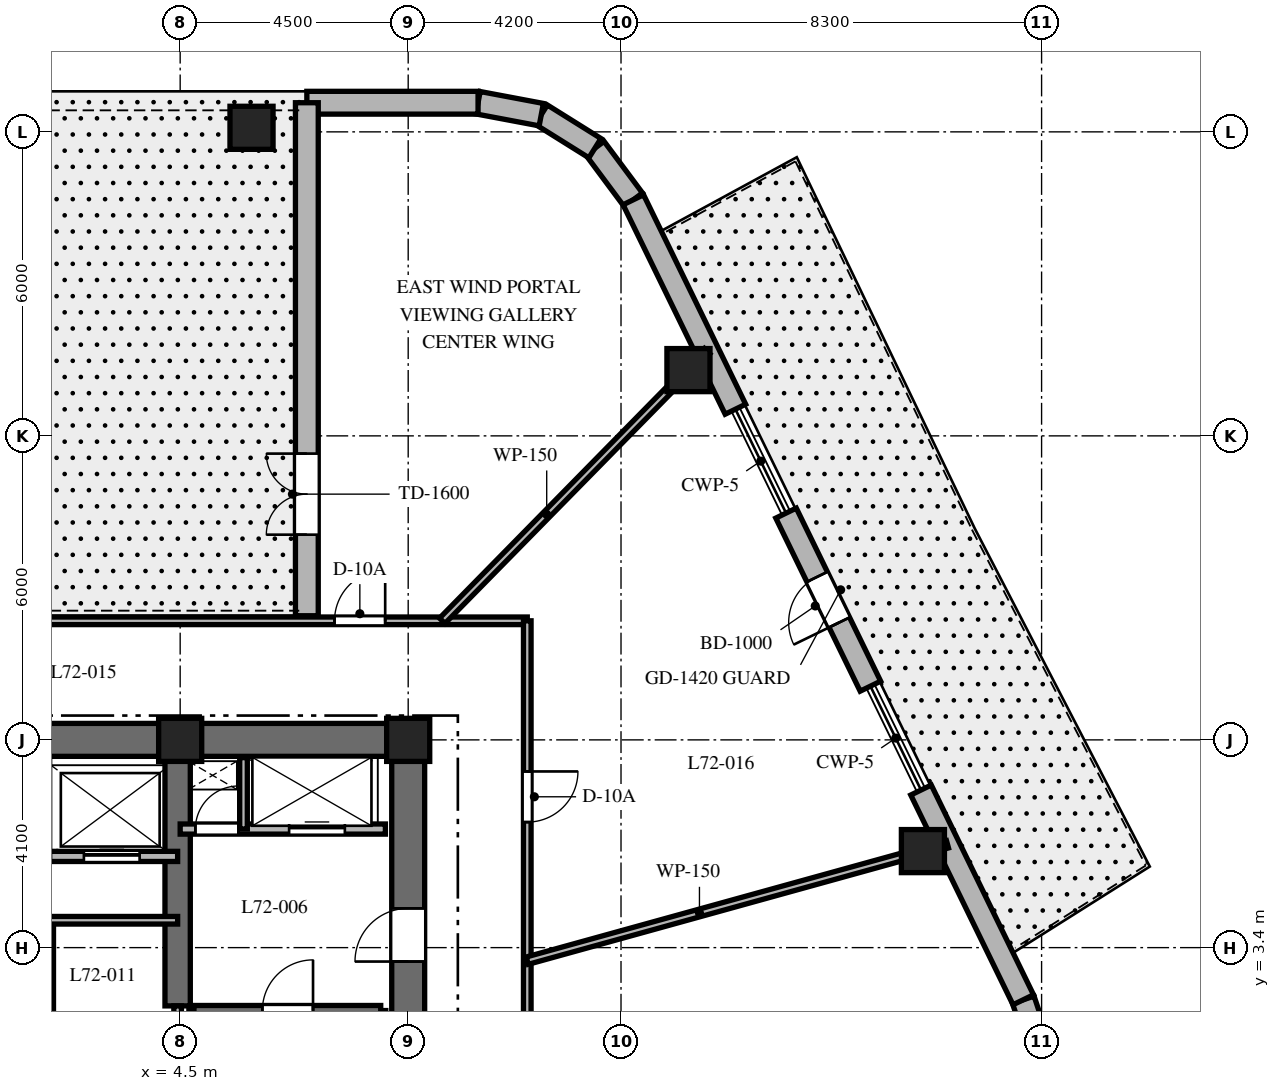
"""IFC4 building model, lengths in metres.
Left out: names, types, materials, properties, quantities, classifications, styles, units other than length and angle.
Written with IfcOpenShell. Run it as: python <this file> out.ifc"""

import sys

from ifc_helpers import new_model, si_unit, direction, frame, frame_2d, origin, origin_2d, place, context, subcontext, project, spatial, rectangle, extrude, element, fill, save


model = new_model("IFC4")
c1 = context("Model", 3, precision=1e-05, world=origin(), true_north=direction((0.0, 1.0)))
c2 = subcontext(c1, "Body", "Model", "MODEL_VIEW")
j1 = project(units=[si_unit("LENGTHUNIT", "METRE"), si_unit("PLANEANGLEUNIT", "RADIAN")], contexts=[c1])
p1 = place(None, origin())
s1 = spatial("IfcSite", under=j1, at=p1, CompositionType="ELEMENT")
p2 = place(p1, origin())
s2 = spatial("IfcBuilding", under=s1, at=p2, CompositionType="ELEMENT")
p3 = place(p2, frame((0.0, 0.0, 288.6)))
s3 = spatial("IfcBuildingStorey", under=s2, at=p3, CompositionType="ELEMENT", Elevation=288.6)
p4 = place(p3, frame((1.85, 7.5, 0.0), z_axis=(0.0, 0.0, 1.0), x_axis=(1.0, 0.0, 0.0)))
e1 = element("IfcWall", 1, at=p4, inside=s3, PredefinedType="SHEAR", context=c2, shape_type="SweptSolid", body=[
    extrude(rectangle(XDim=7.475, YDim=0.65, at=frame_2d((3.737, 0.0))), origin(), (0.0, 0.0, 1.0), 4.5),
])
p5 = place(p3, frame((9.0, -7.175, 0.0), z_axis=(0.0, 0.0, 1.0), x_axis=(0.0, 1.0, 0.0)))
e2 = element("IfcWall", 2, at=p5, inside=s3, PredefinedType="SHEAR", context=c2, shape_type="SweptSolid", body=[
    extrude(rectangle(XDim=14.35, YDim=0.65, at=frame_2d((7.175, 0.0))), origin(), (0.0, 0.0, 1.0), 4.5),
])
p6 = place(p5, frame((10.3, 0.0, 0.0)))
e3 = element("IfcOpeningElement", 3, at=p6, cuts=e2, PredefinedType="OPENING", context=c2, shape_type="SweptSolid", body=[
    extrude(rectangle(XDim=1.05, YDim=2.15, at=frame_2d((0.525, 1.075))), frame((0.0, 0.335, 0.0), z_axis=(0.0, -1.0, 0.0), x_axis=(1.0, 0.0, 0.0)), (0.0, 0.0, 1.0), 0.67),
])
p7 = place(p3, frame((4.45, 2.25, 0.0), z_axis=(0.0, 0.0, 1.0), x_axis=(0.0, 1.0, 0.0)))
e4 = element("IfcWall", 4, at=p7, inside=s3, PredefinedType="SHEAR", context=c2, shape_type="SweptSolid", body=[
    extrude(rectangle(XDim=4.925, YDim=0.5, at=frame_2d((2.462, 0.0))), origin(), (0.0, 0.0, 1.0), 4.5),
])
for number, where, z_axis, x_axis in (
    (5, (4.772, -6.985, 0.0), (0.0, 0.0, 1.0), (0.0, 1.0, 0.0)),
    (6, (8.458, -6.985, 0.0), (0.0, 0.0, 1.0), (0.0, 1.0, 0.0)),
):
    element("IfcWall", number, at=place(p3, frame(where, z_axis=z_axis, x_axis=x_axis)), inside=s3, PredefinedType="SHEAR", context=c2, shape_type="SweptSolid", body=[
        extrude(rectangle(XDim=9.143, YDim=0.2, at=frame_2d((4.572, 0.0))), origin(), (0.0, 0.0, 1.0), 4.5),
    ])
p8 = place(p3, frame((4.772, 2.158, 0.0), z_axis=(0.0, 0.0, 1.0), x_axis=(1.0, 0.0, 0.0)))
e7 = element("IfcWall", 7, at=p8, inside=s3, PredefinedType="SHEAR", context=c2, shape_type="SweptSolid", body=[
    extrude(rectangle(XDim=3.686, YDim=0.2, at=frame_2d((1.843, 0.0))), origin(), (0.0, 0.0, 1.0), 4.5),
])
p9 = place(p8, frame((1.35, 0.0, 0.0)))
e8 = element("IfcOpeningElement", 8, at=p9, cuts=e7, PredefinedType="OPENING", context=c2, shape_type="SweptSolid", body=[
    extrude(rectangle(XDim=1.0, YDim=2.15, at=frame_2d((0.5, 1.075))), frame((0.0, 0.11, 0.0), z_axis=(0.0, -1.0, 0.0), x_axis=(1.0, 0.0, 0.0)), (0.0, 0.0, 1.0), 0.22),
])
for number, where, z_axis, x_axis in (
    (9, (9.0, 7.5, 0.0), (0.0, 0.0, 1.0), (1.0, 0.0, 0.0)),
    (10, (4.5, 7.5, 0.0), (0.0, 0.0, 1.0), (1.0, 0.0, 0.0)),
    (11, (19.158, 5.305, 0.0), (0.0, 0.0, 1.0), (1.0, 0.0, 0.0)),
    (12, (14.531, 14.798, 0.0), (0.0, 0.0, 1.0), (1.0, 0.0, 0.0)),
    (13, (5.908, 19.58, 0.0), (0.0, 0.0, 1.0), (1.0, 0.0, 0.0)),
):
    element("IfcColumn", number, at=place(p3, frame(where, z_axis=z_axis, x_axis=x_axis)), inside=s3, PredefinedType="COLUMN", context=c2, shape_type="SweptSolid", body=[
        extrude(rectangle(XDim=0.85, YDim=0.85, at=origin_2d()), origin(), (0.0, 0.0, 1.0), 4.5),
    ])
p10 = place(p3, frame((21.422, 1.522, 0.0), z_axis=(0.0, 0.0, 1.0), x_axis=(-0.316964162323, 0.94843751497, 0.0)))
e14 = element("IfcWall", 14, at=p10, inside=s3, PredefinedType="SOLIDWALL", context=c2, shape_type="SweptSolid", body=[
    extrude(rectangle(XDim=0.895, YDim=0.45, at=frame_2d((0.448, 0.0))), origin(), (0.0, 0.0, 1.0), 4.18),
])
p11 = place(p3, frame((13.443, 18.16, 0.0), z_axis=(0.0, 0.0, 1.0), x_axis=(-0.597042425808, 0.802209661987, 0.0)))
e15 = element("IfcWall", 15, at=p11, inside=s3, PredefinedType="SOLIDWALL", context=c2, shape_type="SweptSolid", body=[
    extrude(rectangle(XDim=1.27, YDim=0.45, at=frame_2d((0.635, 0.0))), origin(), (0.0, 0.0, 1.0), 4.18),
])
p12 = place(p3, frame((12.685, 19.178, 0.0), z_axis=(0.0, 0.0, 1.0), x_axis=(-0.848031272749, 0.529946186362, 0.0)))
e16 = element("IfcWall", 16, at=p12, inside=s3, PredefinedType="SOLIDWALL", context=c2, shape_type="SweptSolid", body=[
    extrude(rectangle(XDim=1.248, YDim=0.45, at=frame_2d((0.624, 0.0))), origin(), (0.0, 0.0, 1.0), 4.18),
])
p13 = place(p3, frame((11.626, 19.84, 0.0), z_axis=(0.0, 0.0, 1.0), x_axis=(-0.982701956681, 0.185194126083, 0.0)))
e17 = element("IfcWall", 17, at=p13, inside=s3, PredefinedType="SOLIDWALL", context=c2, shape_type="SweptSolid", body=[
    extrude(rectangle(XDim=1.27, YDim=0.45, at=frame_2d((0.635, 0.0))), origin(), (0.0, 0.0, 1.0), 4.18),
])
p14 = place(p3, frame((21.138, 2.371, 0.0), z_axis=(0.0, 0.0, 1.0), x_axis=(-0.438135313339, 0.898909031663, 0.0)))
e18 = element("IfcWall", 18, at=p14, inside=s3, PredefinedType="SOLIDWALL", context=c2, shape_type="SweptSolid", body=[
    extrude(rectangle(XDim=4.605, YDim=0.45, at=frame_2d((2.302, 0.0))), origin(), (0.0, 0.0, 1.0), 4.18),
])
p15 = place(p3, frame((18.122, 8.56, 0.0), z_axis=(0.0, 0.0, 1.0), x_axis=(-0.438118536586, 0.89891720859, 0.0)))
e19 = element("IfcWall", 19, at=p15, inside=s3, PredefinedType="SOLIDWALL", context=c2, shape_type="SweptSolid", body=[
    extrude(rectangle(XDim=3.8, YDim=0.45, at=frame_2d((1.9, 0.0))), origin(), (0.0, 0.0, 1.0), 4.18),
])
p16 = place(p15, frame((1.4, 0.0, 0.0)))
e20 = element("IfcOpeningElement", 20, at=p16, cuts=e19, PredefinedType="OPENING", context=c2, shape_type="SweptSolid", body=[
    extrude(rectangle(XDim=1.0, YDim=2.15, at=frame_2d((0.5, 1.075))), frame((0.0, 0.235, 0.0), z_axis=(0.0, -1.0, 0.0), x_axis=(1.0, 0.0, 0.0)), (0.0, 0.0, 1.0), 0.47),
])
p17 = place(p3, frame((15.458, 14.026, 0.0), z_axis=(0.0, 0.0, 1.0), x_axis=(-0.438101439155, 0.898925541416, 0.0)))
e21 = element("IfcWall", 21, at=p17, inside=s3, PredefinedType="SOLIDWALL", context=c2, shape_type="SweptSolid", body=[
    extrude(rectangle(XDim=4.599, YDim=0.45, at=frame_2d((2.299, 0.0))), origin(), (0.0, 0.0, 1.0), 4.18),
])
p18 = place(p3, frame((10.379, 20.075, 0.0), z_axis=(0.0, 0.0, 1.0), x_axis=(-1.0, 0.0, 0.0)))
e22 = element("IfcWall", 22, at=p18, inside=s3, PredefinedType="SOLIDWALL", context=c2, shape_type="SweptSolid", body=[
    extrude(rectangle(XDim=3.379, YDim=0.45, at=frame_2d((1.689, 0.0))), origin(), (0.0, 0.0, 1.0), 4.18),
])
p19 = place(p3, frame((7.0, 9.95, 0.0), z_axis=(0.0, 0.0, 1.0), x_axis=(0.0, 1.0, 0.0)))
e23 = element("IfcWall", 23, at=p19, inside=s3, PredefinedType="SOLIDWALL", context=c2, shape_type="SweptSolid", body=[
    extrude(rectangle(XDim=10.125, YDim=0.45, at=frame_2d((5.062, 0.0))), origin(), (0.0, 0.0, 1.0), 4.18),
])
p20 = place(p19, frame((1.6, 0.0, 0.0)))
e24 = element("IfcOpeningElement", 24, at=p20, cuts=e23, PredefinedType="OPENING", context=c2, shape_type="SweptSolid", body=[
    extrude(rectangle(XDim=1.6, YDim=2.25, at=frame_2d((0.8, 1.125))), frame((0.0, 0.235, 0.0), z_axis=(0.0, -1.0, 0.0), x_axis=(1.0, 0.0, 0.0)), (0.0, 0.0, 1.0), 0.47),
])
p21 = place(p3, frame((4.5, 5.74, 0.0), z_axis=(0.0, 0.0, 1.0), x_axis=(1.0, 0.0, 0.0)))
e25 = element("IfcWall", 25, at=p21, inside=s3, PredefinedType="PARTITIONING", context=c2, shape_type="SweptSolid", body=[
    extrude(rectangle(XDim=4.05, YDim=0.2, at=frame_2d((2.025, 0.0))), origin(), (0.0, 0.0, 1.0), 4.18),
])
p22 = place(p21, frame((0.3, 0.0, 0.0)))
e26 = element("IfcOpeningElement", 26, at=p22, cuts=e25, PredefinedType="OPENING", context=c2, shape_type="SweptSolid", body=[
    extrude(rectangle(XDim=0.85, YDim=2.03, at=frame_2d((0.425, 1.015))), frame((0.0, 0.11, 0.0), z_axis=(0.0, -1.0, 0.0), x_axis=(1.0, 0.0, 0.0)), (0.0, 0.0, 1.0), 0.22),
])
p23 = place(p21, frame((2.15, 0.0, 0.0)))
e27 = element("IfcOpeningElement", 27, at=p23, cuts=e25, PredefinedType="OPENING", context=c2, shape_type="SweptSolid", body=[
    extrude(rectangle(XDim=1.1, YDim=2.2, at=frame_2d((0.55, 1.1))), frame((0.0, 0.11, 0.0), z_axis=(0.0, -1.0, 0.0), x_axis=(1.0, 0.0, 0.0)), (0.0, 0.0, 1.0), 0.22),
])
p24 = place(p3, frame((5.75, 5.74, 0.0), z_axis=(0.0, 0.0, 1.0), x_axis=(0.0, 1.0, 0.0)))
e28 = element("IfcWall", 28, at=p24, inside=s3, PredefinedType="PARTITIONING", context=c2, shape_type="SweptSolid", body=[
    extrude(rectangle(XDim=1.41, YDim=0.15, at=frame_2d((0.705, 0.0))), origin(), (0.0, 0.0, 1.0), 4.18),
])
p25 = place(p3, frame((1.85, 5.2, 0.0), z_axis=(0.0, 0.0, 1.0), x_axis=(1.0, 0.0, 0.0)))
e29 = element("IfcWall", 29, at=p25, inside=s3, PredefinedType="PARTITIONING", context=c2, shape_type="SweptSolid", body=[
    extrude(rectangle(XDim=2.6, YDim=0.2, at=frame_2d((1.3, 0.0))), origin(), (0.0, 0.0, 1.0), 4.18),
])
p26 = place(p25, frame((0.75, 0.0, 0.0)))
e30 = element("IfcOpeningElement", 30, at=p26, cuts=e29, PredefinedType="OPENING", context=c2, shape_type="SweptSolid", body=[
    extrude(rectangle(XDim=1.1, YDim=2.2, at=frame_2d((0.55, 1.1))), frame((0.0, 0.11, 0.0), z_axis=(0.0, -1.0, 0.0), x_axis=(1.0, 0.0, 0.0)), (0.0, 0.0, 1.0), 0.22),
])
p27 = place(p3, frame((4.45, -1.972, 0.0), z_axis=(0.0, 0.0, 1.0), x_axis=(0.0, 1.0, 0.0)))
e31 = element("IfcWall", 31, at=p27, inside=s3, PredefinedType="PARTITIONING", context=c2, shape_type="SweptSolid", body=[
    extrude(rectangle(XDim=4.222, YDim=0.15, at=frame_2d((2.111, 0.0))), origin(), (0.0, 0.0, 1.0), 4.18),
])
p28 = place(p3, frame((1.9, -0.5, 0.0), z_axis=(0.0, 0.0, 1.0), x_axis=(0.0, 1.0, 0.0)))
e32 = element("IfcWall", 32, at=p28, inside=s3, PredefinedType="PARTITIONING", context=c2, shape_type="SweptSolid", body=[
    extrude(rectangle(XDim=4.44, YDim=0.2, at=frame_2d((2.22, 0.0))), origin(), (0.0, 0.0, 1.0), 4.18),
])
p29 = place(p28, frame((1.55, 0.0, 0.0)))
e33 = element("IfcOpeningElement", 33, at=p29, cuts=e32, PredefinedType="OPENING", context=c2, shape_type="SweptSolid", body=[
    extrude(rectangle(XDim=0.85, YDim=2.03, at=frame_2d((0.425, 1.015))), frame((0.0, 0.11, 0.0), z_axis=(0.0, -1.0, 0.0), x_axis=(1.0, 0.0, 0.0)), (0.0, 0.0, 1.0), 0.22),
])
p30 = place(p3, frame((1.9, 3.94, 0.0), z_axis=(0.0, 0.0, 1.0), x_axis=(1.0, 0.0, 0.0)))
e34 = element("IfcWall", 34, at=p30, inside=s3, PredefinedType="PARTITIONING", context=c2, shape_type="SweptSolid", body=[
    extrude(rectangle(XDim=2.55, YDim=0.15, at=frame_2d((1.275, 0.0))), origin(), (0.0, 0.0, 1.0), 4.18),
])
p31 = place(p3, frame((-11.35, 9.85, 0.0), z_axis=(0.0, 0.0, 1.0), x_axis=(1.0, 0.0, 0.0)))
e35 = element("IfcWall", 35, at=p31, inside=s3, PredefinedType="PARTITIONING", context=c2, shape_type="SweptSolid", body=[
    extrude(rectangle(XDim=22.7, YDim=0.15, at=frame_2d((11.35, 0.0))), origin(), (0.0, 0.0, 1.0), 3.67),
])
p32 = place(p31, frame((18.896, 0.0, 0.0)))
e36 = element("IfcOpeningElement", 36, at=p32, cuts=e35, PredefinedType="OPENING", context=c2, shape_type="SweptSolid", body=[
    extrude(rectangle(XDim=1.0, YDim=2.03, at=frame_2d((0.5, 1.015))), frame((0.0, 0.085, 0.0), z_axis=(0.0, -1.0, 0.0), x_axis=(1.0, 0.0, 0.0)), (0.0, 0.0, 1.0), 0.17),
])
p33 = place(p3, frame((11.35, 9.85, 0.0), z_axis=(0.0, 0.0, 1.0), x_axis=(0.0, -1.0, 0.0)))
e37 = element("IfcWall", 37, at=p33, inside=s3, PredefinedType="PARTITIONING", context=c2, shape_type="SweptSolid", body=[
    extrude(rectangle(XDim=19.7, YDim=0.15, at=frame_2d((9.85, 0.0))), origin(), (0.0, 0.0, 1.0), 3.67),
])
p34 = place(p33, frame((2.973, 0.0, 0.0)))
e38 = element("IfcOpeningElement", 38, at=p34, cuts=e37, PredefinedType="OPENING", context=c2, shape_type="SweptSolid", body=[
    extrude(rectangle(XDim=1.0, YDim=2.03, at=frame_2d((0.5, 1.015))), frame((0.0, 0.085, 0.0), z_axis=(0.0, -1.0, 0.0), x_axis=(1.0, 0.0, 0.0)), (0.0, 0.0, 1.0), 0.17),
])
p35 = place(p33, frame((15.189, 0.0, 0.0)))
e39 = element("IfcOpeningElement", 39, at=p35, cuts=e37, PredefinedType="OPENING", context=c2, shape_type="SweptSolid", body=[
    extrude(rectangle(XDim=1.0, YDim=2.03, at=frame_2d((0.5, 1.015))), frame((0.0, 0.085, 0.0), z_axis=(0.0, -1.0, 0.0), x_axis=(1.0, 0.0, 0.0)), (0.0, 0.0, 1.0), 0.17),
])
p36 = place(p33, frame((8.81, 0.0, 0.0)))
e40 = element("IfcOpeningElement", 40, at=p36, cuts=e37, PredefinedType="OPENING", context=c2, shape_type="SweptSolid", body=[
    extrude(rectangle(XDim=1.0, YDim=2.03, at=frame_2d((0.5, 1.015))), frame((0.0, 0.085, 0.0), z_axis=(0.0, -1.0, 0.0), x_axis=(1.0, 0.0, 0.0)), (0.0, 0.0, 1.0), 0.17),
])
p37 = place(p3, frame((11.35, 3.143, 0.0), z_axis=(0.0, 0.0, 1.0), x_axis=(0.963731818141, 0.266872596386, 0.0)))
e41 = element("IfcWall", 41, at=p37, inside=s3, PredefinedType="PARTITIONING", context=c2, shape_type="SweptSolid", body=[
    extrude(rectangle(XDim=8.605, YDim=0.15, at=frame_2d((4.302, 0.0))), origin(), (0.0, 0.0, 1.0), 3.52),
])
p38 = place(p3, frame((9.672, 9.85, 0.0), z_axis=(0.0, 0.0, 1.0), x_axis=(0.700629771301, 0.713524998558, 0.0)))
e42 = element("IfcWall", 42, at=p38, inside=s3, PredefinedType="PARTITIONING", context=c2, shape_type="SweptSolid", body=[
    extrude(rectangle(XDim=7.459, YDim=0.15, at=frame_2d((3.73, 0.0))), origin(), (0.0, 0.0, 1.0), 3.52),
])
p39 = place(p16, origin())
e43 = element("IfcDoor", 43, at=p39, inside=s3, OperationType="SINGLE_SWING_LEFT", PredefinedType="DOOR", context=c2, shape_type="SweptSolid", body=[
    extrude(rectangle(XDim=1.0, YDim=2.15, at=frame_2d((0.5, 1.075))), frame((0.0, 0.025, 0.0), z_axis=(0.0, -1.0, 0.0), x_axis=(1.0, 0.0, 0.0)), (0.0, 0.0, 1.0), 0.05),
])
fill(e20, e43)
p40 = place(p20, origin())
e44 = element("IfcDoor", 44, at=p40, inside=s3, OperationType="DOUBLE_SWING_LEFT", PredefinedType="DOOR", context=c2, shape_type="SweptSolid", body=[
    extrude(rectangle(XDim=1.6, YDim=2.25, at=frame_2d((0.8, 1.125))), frame((0.0, 0.025, 0.0), z_axis=(0.0, -1.0, 0.0), x_axis=(1.0, 0.0, 0.0)), (0.0, 0.0, 1.0), 0.05),
])
fill(e24, e44)
p41 = place(p9, origin())
e45 = element("IfcDoor", 45, at=p41, inside=s3, OperationType="SINGLE_SWING_RIGHT", PredefinedType="DOOR", context=c2, shape_type="SweptSolid", body=[
    extrude(rectangle(XDim=1.0, YDim=2.15, at=frame_2d((0.5, 1.075))), frame((0.0, 0.025, 0.0), z_axis=(0.0, -1.0, 0.0), x_axis=(1.0, 0.0, 0.0)), (0.0, 0.0, 1.0), 0.05),
])
fill(e8, e45)
p42 = place(p6, origin())
e46 = element("IfcDoor", 46, at=p42, inside=s3, OperationType="SINGLE_SWING_LEFT", PredefinedType="DOOR", context=c2, shape_type="SweptSolid", body=[
    extrude(rectangle(XDim=1.05, YDim=2.15, at=frame_2d((0.525, 1.075))), frame((0.0, 0.025, 0.0), z_axis=(0.0, -1.0, 0.0), x_axis=(1.0, 0.0, 0.0)), (0.0, 0.0, 1.0), 0.05),
])
fill(e3, e46)
p43 = place(p22, origin())
e47 = element("IfcDoor", 47, at=p43, inside=s3, OperationType="SINGLE_SWING_RIGHT", PredefinedType="DOOR", context=c2, shape_type="SweptSolid", body=[
    extrude(rectangle(XDim=0.85, YDim=2.03, at=frame_2d((0.425, 1.015))), frame((0.0, 0.025, 0.0), z_axis=(0.0, -1.0, 0.0), x_axis=(1.0, 0.0, 0.0)), (0.0, 0.0, 1.0), 0.05),
])
fill(e26, e47)
p44 = place(p23, origin())
e48 = element("IfcDoor", 48, at=p44, inside=s3, OperationType="SLIDING_TO_RIGHT", PredefinedType="DOOR", context=c2, shape_type="SweptSolid", body=[
    extrude(rectangle(XDim=1.1, YDim=2.2, at=frame_2d((0.55, 1.1))), frame((0.0, 0.025, 0.0), z_axis=(0.0, -1.0, 0.0), x_axis=(1.0, 0.0, 0.0)), (0.0, 0.0, 1.0), 0.05),
])
fill(e27, e48)
p45 = place(p26, origin())
e49 = element("IfcDoor", 49, at=p45, inside=s3, OperationType="SLIDING_TO_RIGHT", PredefinedType="DOOR", context=c2, shape_type="SweptSolid", body=[
    extrude(rectangle(XDim=1.1, YDim=2.2, at=frame_2d((0.55, 1.1))), frame((0.0, 0.025, 0.0), z_axis=(0.0, -1.0, 0.0), x_axis=(1.0, 0.0, 0.0)), (0.0, 0.0, 1.0), 0.05),
])
fill(e30, e49)
p46 = place(p34, origin())
e50 = element("IfcDoor", 50, at=p46, inside=s3, OperationType="SINGLE_SWING_LEFT", PredefinedType="DOOR", context=c2, shape_type="SweptSolid", body=[
    extrude(rectangle(XDim=1.0, YDim=2.03, at=frame_2d((0.5, 1.015))), frame((0.0, 0.025, 0.0), z_axis=(0.0, -1.0, 0.0), x_axis=(1.0, 0.0, 0.0)), (0.0, 0.0, 1.0), 0.05),
])
fill(e38, e50)
p47 = place(p32, origin())
e51 = element("IfcDoor", 51, at=p47, inside=s3, OperationType="SINGLE_SWING_RIGHT", PredefinedType="DOOR", context=c2, shape_type="SweptSolid", body=[
    extrude(rectangle(XDim=1.0, YDim=2.03, at=frame_2d((0.5, 1.015))), frame((0.0, 0.025, 0.0), z_axis=(0.0, -1.0, 0.0), x_axis=(1.0, 0.0, 0.0)), (0.0, 0.0, 1.0), 0.05),
])
fill(e36, e51)
save(model, sys.argv[1])
